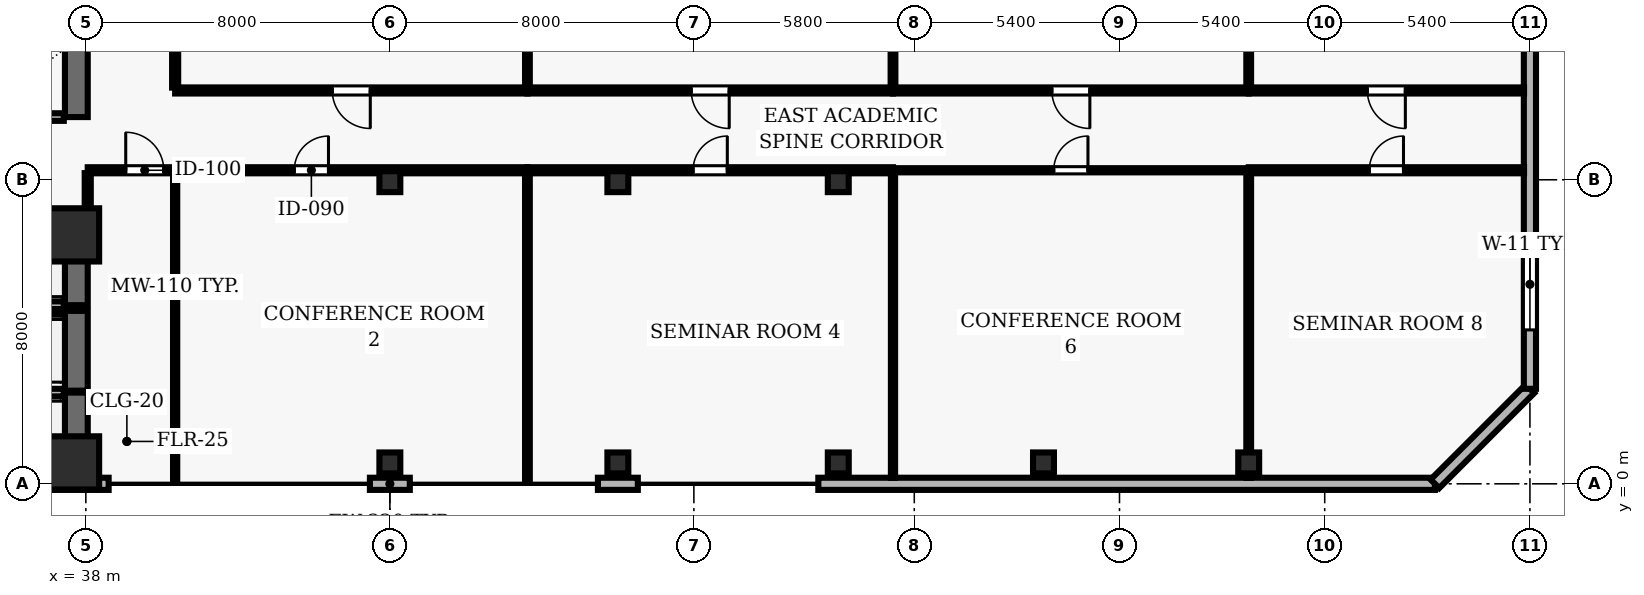
"""IFC4 building model, lengths in metres.
Left out: names, types, materials, properties, quantities, classifications, styles, units other than length and angle.
Written with IfcOpenShell. Run it as: python <this file> out.ifc"""

import sys

from ifc_helpers import new_model, si_unit, direction, frame, frame_2d, origin, origin_2d, place, context, subcontext, project, spatial, rectangle, hollow_rectangle, extrude, element, fill, save


model = new_model("IFC4")
c1 = context("Model", 3, precision=1e-05, world=origin(), true_north=direction((0.0, 1.0)))
c2 = subcontext(c1, "Body", "Model", "MODEL_VIEW")
j1 = project(units=[si_unit("LENGTHUNIT", "METRE"), si_unit("PLANEANGLEUNIT", "RADIAN")], contexts=[c1])
p1 = place(None, origin())
s1 = spatial("IfcSite", under=j1, at=p1, CompositionType="ELEMENT")
p2 = place(p1, origin())
s2 = spatial("IfcBuilding", under=s1, at=p2, CompositionType="ELEMENT")
p3 = place(p2, frame((0.0, 0.0, 85.6)))
s3 = spatial("IfcBuildingStorey", under=s2, at=p3, CompositionType="ELEMENT", Elevation=85.6)
for number, where, z_axis, x_axis in (
    (1, (37.65, 0.55, 0.0), (0.0, 0.0, 1.0), (1.0, 0.0, 0.0)),
    (2, (37.65, 6.55, 0.0), (0.0, 0.0, 1.0), (1.0, 0.0, 0.0)),
):
    element("IfcColumn", number, at=place(p3, frame(where, z_axis=z_axis, x_axis=x_axis)), inside=s3, PredefinedType="COLUMN", context=c2, shape_type="SweptSolid", body=[
        extrude(rectangle(XDim=1.4, YDim=1.4, at=origin_2d()), origin(), (0.0, 0.0, 1.0), 3.9),
    ])
for number, where, z_axis, x_axis in (
    (3, (46.0, 0.55, 0.0), (0.0, 0.0, 1.0), (1.0, 0.0, 0.0)),
    (4, (46.0, 7.95, 0.0), (0.0, 0.0, 1.0), (1.0, 0.0, 0.0)),
    (5, (52.0, 0.55, 0.0), (0.0, 0.0, 1.0), (1.0, 0.0, 0.0)),
    (6, (52.0, 7.95, 0.0), (0.0, 0.0, 1.0), (1.0, 0.0, 0.0)),
    (7, (57.8, 0.55, 0.0), (0.0, 0.0, 1.0), (1.0, 0.0, 0.0)),
    (8, (57.8, 7.95, 0.0), (0.0, 0.0, 1.0), (1.0, 0.0, 0.0)),
    (9, (63.2, 0.55, 0.0), (0.0, 0.0, 1.0), (1.0, 0.0, 0.0)),
    (10, (68.6, 0.55, 0.0), (0.0, 0.0, 1.0), (1.0, 0.0, 0.0)),
):
    element("IfcColumn", number, at=place(p3, frame(where, z_axis=z_axis, x_axis=x_axis)), inside=s3, PredefinedType="COLUMN", context=c2, shape_type="SweptSolid", body=[
        extrude(hollow_rectangle(XDim=0.55, YDim=0.55, WallThickness=0.025, at=origin_2d()), origin(), (0.0, 0.0, 1.0), 3.9),
    ])
p4 = place(p3, frame((30.8, 0.0, 0.0), z_axis=(0.0, 0.0, 1.0), x_axis=(1.0, 0.0, 0.0)))
e11 = element("IfcWall", 11, at=p4, inside=s3, PredefinedType="SOLIDWALL", context=c2, shape_type="SweptSolid", body=[
    extrude(rectangle(XDim=7.8, YDim=0.32, at=frame_2d((3.9, 0.0))), origin(), (0.0, 0.0, 1.0), 3.69),
])
for number, where, z_axis, x_axis in (
    (12, (45.475, 0.0, 0.0), (0.0, 0.0, 1.0), (1.0, 0.0, 0.0)),
    (13, (51.475, 0.0, 0.0), (0.0, 0.0, 1.0), (1.0, 0.0, 0.0)),
):
    element("IfcWall", number, at=place(p3, frame(where, z_axis=z_axis, x_axis=x_axis)), inside=s3, PredefinedType="SOLIDWALL", context=c2, shape_type="SweptSolid", body=[
        extrude(rectangle(XDim=1.05, YDim=0.32, at=frame_2d((0.525, 0.0))), origin(), (0.0, 0.0, 1.0), 3.69),
    ])
p5 = place(p3, frame((57.275, 0.0, 0.0), z_axis=(0.0, 0.0, 1.0), x_axis=(1.0, 0.0, 0.0)))
e14 = element("IfcWall", 14, at=p5, inside=s3, PredefinedType="SOLIDWALL", context=c2, shape_type="SweptSolid", body=[
    extrude(rectangle(XDim=16.225, YDim=0.32, at=frame_2d((8.113, 0.0))), origin(), (0.0, 0.0, 1.0), 3.69),
])
p6 = place(p3, frame((73.5, 0.0, 0.0), z_axis=(0.0, 0.0, 1.0), x_axis=(0.707106781187, 0.707106781187, 0.0)))
e15 = element("IfcWall", 15, at=p6, inside=s3, PredefinedType="SOLIDWALL", context=c2, shape_type="SweptSolid", body=[
    extrude(rectangle(XDim=3.536, YDim=0.32, at=frame_2d((1.768, 0.0))), origin(), (0.0, 0.0, 1.0), 3.69),
])
p7 = place(p3, frame((76.0, 2.5, 0.0), z_axis=(0.0, 0.0, 1.0), x_axis=(0.0, 1.0, 0.0)))
e16 = element("IfcWall", 16, at=p7, inside=s3, PredefinedType="SOLIDWALL", context=c2, shape_type="SweptSolid", body=[
    extrude(rectangle(XDim=11.0, YDim=0.32, at=frame_2d((5.5, 0.0))), origin(), (0.0, 0.0, 1.0), 3.69),
])
p8 = place(p7, frame((1.55, 0.0, 0.9)))
e17 = element("IfcOpeningElement", 17, at=p8, cuts=e16, PredefinedType="OPENING", context=c2, shape_type="SweptSolid", body=[
    extrude(rectangle(XDim=2.4, YDim=2.2, at=frame_2d((1.2, 1.1))), frame((0.0, 0.17, 0.0), z_axis=(0.0, -1.0, 0.0), x_axis=(1.0, 0.0, 0.0)), (0.0, 0.0, 1.0), 0.34),
])
p9 = place(p3, frame((37.75, 0.3, 0.0), z_axis=(0.0, 0.0, 1.0), x_axis=(0.0, 1.0, 0.0)))
e18 = element("IfcWall", 18, at=p9, inside=s3, PredefinedType="SHEAR", context=c2, shape_type="SweptSolid", body=[
    extrude(rectangle(XDim=2.1, YDim=0.6, at=frame_2d((1.05, 0.0))), origin(), (0.0, 0.0, 1.0), 3.69),
])
for number, where, z_axis, x_axis in (
    (19, (35.28, 0.3, 0.0), (0.0, 0.0, 1.0), (1.0, 0.0, 0.0)),
    (20, (37.42, 2.4, 0.0), (0.0, 0.0, 1.0), (-1.0, 0.0, 0.0)),
):
    element("IfcWall", number, at=place(p3, frame(where, z_axis=z_axis, x_axis=x_axis)), inside=s3, PredefinedType="SOLIDWALL", context=c2, shape_type="SweptSolid", body=[
        extrude(rectangle(XDim=2.14, YDim=0.2, at=frame_2d((1.07, 0.0))), origin(), (0.0, 0.0, 1.0), 3.69),
    ])
p10 = place(p3, frame((37.75, 2.45, 0.0), z_axis=(0.0, 0.0, 1.0), x_axis=(0.0, 1.0, 0.0)))
e21 = element("IfcWall", 21, at=p10, inside=s3, PredefinedType="SHEAR", context=c2, shape_type="SweptSolid", body=[
    extrude(rectangle(XDim=2.1, YDim=0.6, at=frame_2d((1.05, 0.0))), origin(), (0.0, 0.0, 1.0), 3.69),
])
p11 = place(p3, frame((37.42, 4.55, 0.0), z_axis=(0.0, 0.0, 1.0), x_axis=(-1.0, 0.0, 0.0)))
e22 = element("IfcWall", 22, at=p11, inside=s3, PredefinedType="SOLIDWALL", context=c2, shape_type="SweptSolid", body=[
    extrude(rectangle(XDim=2.14, YDim=0.2, at=frame_2d((1.07, 0.0))), origin(), (0.0, 0.0, 1.0), 3.69),
])
p12 = place(p3, frame((37.75, 4.7, 0.0), z_axis=(0.0, 0.0, 1.0), x_axis=(0.0, 1.0, 0.0)))
e23 = element("IfcWall", 23, at=p12, inside=s3, PredefinedType="SHEAR", context=c2, shape_type="SweptSolid", body=[
    extrude(rectangle(XDim=2.25, YDim=0.6, at=frame_2d((1.125, 0.0))), origin(), (0.0, 0.0, 1.0), 3.69),
])
for number, where, z_axis, x_axis in (
    (24, (35.28, 4.7, 0.0), (0.0, 0.0, 1.0), (1.0, 0.0, 0.0)),
    (25, (37.42, 6.95, 0.0), (0.0, 0.0, 1.0), (-1.0, 0.0, 0.0)),
):
    element("IfcWall", number, at=place(p3, frame(where, z_axis=z_axis, x_axis=x_axis)), inside=s3, PredefinedType="SOLIDWALL", context=c2, shape_type="SweptSolid", body=[
        extrude(rectangle(XDim=2.14, YDim=0.2, at=frame_2d((1.07, 0.0))), origin(), (0.0, 0.0, 1.0), 3.69),
    ])
p13 = place(p3, frame((37.75, 9.65, 0.0), z_axis=(0.0, 0.0, 1.0), x_axis=(0.0, 1.0, 0.0)))
e26 = element("IfcWall", 26, at=p13, inside=s3, PredefinedType="SHEAR", context=c2, shape_type="SweptSolid", body=[
    extrude(rectangle(XDim=1.9, YDim=0.6, at=frame_2d((0.95, 0.0))), origin(), (0.0, 0.0, 1.0), 3.69),
])
p14 = place(p3, frame((35.28, 9.65, 0.0), z_axis=(0.0, 0.0, 1.0), x_axis=(1.0, 0.0, 0.0)))
e27 = element("IfcWall", 27, at=p14, inside=s3, PredefinedType="SOLIDWALL", context=c2, shape_type="SweptSolid", body=[
    extrude(rectangle(XDim=2.14, YDim=0.2, at=frame_2d((1.07, 0.0))), origin(), (0.0, 0.0, 1.0), 3.69),
])
p15 = place(p3, frame((38.05, 8.25, 0.0), z_axis=(0.0, 0.0, 1.0), x_axis=(1.0, 0.0, 0.0)))
e28 = element("IfcWall", 28, at=p15, inside=s3, PredefinedType="PARTITIONING", context=c2, shape_type="SweptSolid", body=[
    extrude(rectangle(XDim=2.3, YDim=0.16, at=frame_2d((1.15, 0.0))), origin(), (0.0, 0.0, 1.0), 2.995),
])
p16 = place(p15, frame((1.0, 0.0, 0.0)))
e29 = element("IfcOpeningElement", 29, at=p16, cuts=e28, PredefinedType="OPENING", context=c2, shape_type="SweptSolid", body=[
    extrude(rectangle(XDim=1.0, YDim=2.1, at=frame_2d((0.5, 1.05))), frame((0.0, 0.09, 0.0), z_axis=(0.0, -1.0, 0.0), x_axis=(1.0, 0.0, 0.0)), (0.0, 0.0, 1.0), 0.18),
])
p17 = place(p3, frame((40.35, 8.25, 0.0), z_axis=(0.0, 0.0, 1.0), x_axis=(1.0, 0.0, 0.0)))
e30 = element("IfcWall", 30, at=p17, inside=s3, PredefinedType="PARTITIONING", context=c2, shape_type="SweptSolid", body=[
    extrude(rectangle(XDim=9.27, YDim=0.16, at=frame_2d((4.635, 0.0))), origin(), (0.0, 0.0, 1.0), 2.995),
])
p18 = place(p17, frame((3.135, 0.0, 0.0)))
e31 = element("IfcOpeningElement", 31, at=p18, cuts=e30, PredefinedType="OPENING", context=c2, shape_type="SweptSolid", body=[
    extrude(rectangle(XDim=0.9, YDim=2.1, at=frame_2d((0.45, 1.05))), frame((0.0, 0.09, 0.0), z_axis=(0.0, -1.0, 0.0), x_axis=(1.0, 0.0, 0.0)), (0.0, 0.0, 1.0), 0.18),
])
p19 = place(p3, frame((49.62, 8.25, 0.0), z_axis=(0.0, 0.0, 1.0), x_axis=(1.0, 0.0, 0.0)))
e32 = element("IfcWall", 32, at=p19, inside=s3, PredefinedType="PARTITIONING", context=c2, shape_type="SweptSolid", body=[
    extrude(rectangle(XDim=9.62, YDim=0.16, at=frame_2d((4.81, 0.0))), origin(), (0.0, 0.0, 1.0), 2.995),
])
p20 = place(p19, frame((4.36, 0.0, 0.0)))
e33 = element("IfcOpeningElement", 33, at=p20, cuts=e32, PredefinedType="OPENING", context=c2, shape_type="SweptSolid", body=[
    extrude(rectangle(XDim=0.9, YDim=2.1, at=frame_2d((0.45, 1.05))), frame((0.0, 0.09, 0.0), z_axis=(0.0, -1.0, 0.0), x_axis=(1.0, 0.0, 0.0)), (0.0, 0.0, 1.0), 0.18),
])
p21 = place(p3, frame((49.62, 10.35, 0.0), z_axis=(0.0, 0.0, 1.0), x_axis=(-1.0, 0.0, 0.0)))
e34 = element("IfcWall", 34, at=p21, inside=s3, PredefinedType="PARTITIONING", context=c2, shape_type="SweptSolid", body=[
    extrude(rectangle(XDim=9.27, YDim=0.16, at=frame_2d((4.635, 0.0))), origin(), (0.0, 0.0, 1.0), 3.227),
])
p22 = place(p21, frame((4.135, 0.0, 0.0)))
e35 = element("IfcOpeningElement", 35, at=p22, cuts=e34, PredefinedType="OPENING", context=c2, shape_type="SweptSolid", body=[
    extrude(rectangle(XDim=1.0, YDim=2.1, at=frame_2d((0.5, 1.05))), frame((0.0, 0.09, 0.0), z_axis=(0.0, -1.0, 0.0), x_axis=(1.0, 0.0, 0.0)), (0.0, 0.0, 1.0), 0.18),
])
p23 = place(p3, frame((59.24, 8.25, 0.0), z_axis=(0.0, 0.0, 1.0), x_axis=(1.0, 0.0, 0.0)))
e36 = element("IfcWall", 36, at=p23, inside=s3, PredefinedType="MOVABLE", context=c2, shape_type="SweptSolid", body=[
    extrude(rectangle(XDim=9.36, YDim=0.11, at=frame_2d((4.68, 0.0))), origin(), (0.0, 0.0, 1.0), 3.69),
])
p24 = place(p23, frame((4.23, 0.0, 0.0)))
e37 = element("IfcOpeningElement", 37, at=p24, cuts=e36, PredefinedType="OPENING", context=c2, shape_type="SweptSolid", body=[
    extrude(rectangle(XDim=0.9, YDim=2.1, at=frame_2d((0.45, 1.05))), frame((0.0, 0.065, 0.0), z_axis=(0.0, -1.0, 0.0), x_axis=(1.0, 0.0, 0.0)), (0.0, 0.0, 1.0), 0.13),
])
p25 = place(p3, frame((59.24, 10.35, 0.0), z_axis=(0.0, 0.0, 1.0), x_axis=(-1.0, 0.0, 0.0)))
e38 = element("IfcWall", 38, at=p25, inside=s3, PredefinedType="PARTITIONING", context=c2, shape_type="SweptSolid", body=[
    extrude(rectangle(XDim=9.62, YDim=0.16, at=frame_2d((4.81, 0.0))), origin(), (0.0, 0.0, 1.0), 3.227),
])
p26 = place(p25, frame((4.31, 0.0, 0.0)))
e39 = element("IfcOpeningElement", 39, at=p26, cuts=e38, PredefinedType="OPENING", context=c2, shape_type="SweptSolid", body=[
    extrude(rectangle(XDim=1.0, YDim=2.1, at=frame_2d((0.5, 1.05))), frame((0.0, 0.09, 0.0), z_axis=(0.0, -1.0, 0.0), x_axis=(1.0, 0.0, 0.0)), (0.0, 0.0, 1.0), 0.18),
])
p27 = place(p3, frame((68.6, 8.25, 0.0), z_axis=(0.0, 0.0, 1.0), x_axis=(1.0, 0.0, 0.0)))
e40 = element("IfcWall", 40, at=p27, inside=s3, PredefinedType="PARTITIONING", context=c2, shape_type="SweptSolid", body=[
    extrude(rectangle(XDim=7.245, YDim=0.16, at=frame_2d((3.623, 0.0))), origin(), (0.0, 0.0, 1.0), 3.69),
])
p28 = place(p27, frame((3.173, 0.0, 0.0)))
e41 = element("IfcOpeningElement", 41, at=p28, cuts=e40, PredefinedType="OPENING", context=c2, shape_type="SweptSolid", body=[
    extrude(rectangle(XDim=0.9, YDim=2.1, at=frame_2d((0.45, 1.05))), frame((0.0, 0.09, 0.0), z_axis=(0.0, -1.0, 0.0), x_axis=(1.0, 0.0, 0.0)), (0.0, 0.0, 1.0), 0.18),
])
p29 = place(p3, frame((68.6, 10.35, 0.0), z_axis=(0.0, 0.0, 1.0), x_axis=(-1.0, 0.0, 0.0)))
e42 = element("IfcWall", 42, at=p29, inside=s3, PredefinedType="PARTITIONING", context=c2, shape_type="SweptSolid", body=[
    extrude(rectangle(XDim=9.36, YDim=0.16, at=frame_2d((4.68, 0.0))), origin(), (0.0, 0.0, 1.0), 3.227),
])
p30 = place(p29, frame((4.18, 0.0, 0.0)))
e43 = element("IfcOpeningElement", 43, at=p30, cuts=e42, PredefinedType="OPENING", context=c2, shape_type="SweptSolid", body=[
    extrude(rectangle(XDim=1.0, YDim=2.1, at=frame_2d((0.5, 1.05))), frame((0.0, 0.09, 0.0), z_axis=(0.0, -1.0, 0.0), x_axis=(1.0, 0.0, 0.0)), (0.0, 0.0, 1.0), 0.18),
])
p31 = place(p3, frame((75.845, 10.35, 0.0), z_axis=(0.0, 0.0, 1.0), x_axis=(-1.0, 0.0, 0.0)))
e44 = element("IfcWall", 44, at=p31, inside=s3, PredefinedType="PARTITIONING", context=c2, shape_type="SweptSolid", body=[
    extrude(rectangle(XDim=7.245, YDim=0.16, at=frame_2d((3.623, 0.0))), origin(), (0.0, 0.0, 1.0), 3.69),
])
p32 = place(p31, frame((3.123, 0.0, 0.0)))
e45 = element("IfcOpeningElement", 45, at=p32, cuts=e44, PredefinedType="OPENING", context=c2, shape_type="SweptSolid", body=[
    extrude(rectangle(XDim=1.0, YDim=2.1, at=frame_2d((0.5, 1.05))), frame((0.0, 0.09, 0.0), z_axis=(0.0, -1.0, 0.0), x_axis=(1.0, 0.0, 0.0)), (0.0, 0.0, 1.0), 0.18),
])
p33 = place(p3, frame((38.05, 7.05, 0.0), z_axis=(0.0, 0.0, 1.0), x_axis=(0.0, 1.0, 0.0)))
e46 = element("IfcWall", 46, at=p33, inside=s3, PredefinedType="PARTITIONING", context=c2, shape_type="SweptSolid", body=[
    extrude(rectangle(XDim=1.125, YDim=0.16, at=frame_2d((0.562, 0.0))), origin(), (0.0, 0.0, 1.0), 2.995),
])
p34 = place(p3, frame((40.35, 0.09, 0.0), z_axis=(0.0, 0.0, 1.0), x_axis=(0.0, 1.0, 0.0)))
e47 = element("IfcWall", 47, at=p34, inside=s3, PredefinedType="MOVABLE", context=c2, shape_type="SweptSolid", body=[
    extrude(rectangle(XDim=8.085, YDim=0.11, at=frame_2d((4.042, 0.0))), origin(), (0.0, 0.0, 1.0), 3.69),
])
p35 = place(p3, frame((40.35, 10.425, 0.0), z_axis=(0.0, 0.0, 1.0), x_axis=(0.0, 1.0, 0.0)))
e48 = element("IfcWall", 48, at=p35, inside=s3, PredefinedType="PARTITIONING", context=c2, shape_type="SweptSolid", body=[
    extrude(rectangle(XDim=5.5, YDim=0.16, at=frame_2d((2.75, 0.0))), origin(), (0.0, 0.0, 1.0), 3.227),
])
p36 = place(p3, frame((49.62, 0.09, 0.0), z_axis=(0.0, 0.0, 1.0), x_axis=(0.0, 1.0, 0.0)))
e49 = element("IfcWall", 49, at=p36, inside=s3, PredefinedType="PARTITIONING", context=c2, shape_type="SweptSolid", body=[
    extrude(rectangle(XDim=8.085, YDim=0.125, at=frame_2d((4.042, 0.0))), origin(), (0.0, 0.0, 1.0), 3.69),
])
p37 = place(p3, frame((49.62, 10.425, 0.0), z_axis=(0.0, 0.0, 1.0), x_axis=(0.0, 1.0, 0.0)))
e50 = element("IfcWall", 50, at=p37, inside=s3, PredefinedType="PARTITIONING", context=c2, shape_type="SweptSolid", body=[
    extrude(rectangle(XDim=5.42, YDim=0.125, at=frame_2d((2.71, 0.0))), origin(), (0.0, 0.0, 1.0), 3.69),
])
p38 = place(p3, frame((59.24, 0.155, 0.0), z_axis=(0.0, 0.0, 1.0), x_axis=(0.0, 1.0, 0.0)))
e51 = element("IfcWall", 51, at=p38, inside=s3, PredefinedType="MOVABLE", context=c2, shape_type="SweptSolid", body=[
    extrude(rectangle(XDim=8.02, YDim=0.11, at=frame_2d((4.01, 0.0))), origin(), (0.0, 0.0, 1.0), 3.69),
])
p39 = place(p3, frame((59.24, 10.425, 0.0), z_axis=(0.0, 0.0, 1.0), x_axis=(0.0, 1.0, 0.0)))
e52 = element("IfcWall", 52, at=p39, inside=s3, PredefinedType="PARTITIONING", context=c2, shape_type="SweptSolid", body=[
    extrude(rectangle(XDim=5.42, YDim=0.125, at=frame_2d((2.71, 0.0))), origin(), (0.0, 0.0, 1.0), 3.69),
])
p40 = place(p3, frame((68.6, 0.155, 0.0), z_axis=(0.0, 0.0, 1.0), x_axis=(0.0, 1.0, 0.0)))
e53 = element("IfcWall", 53, at=p40, inside=s3, PredefinedType="PARTITIONING", context=c2, shape_type="SweptSolid", body=[
    extrude(rectangle(XDim=8.02, YDim=0.125, at=frame_2d((4.01, 0.0))), origin(), (0.0, 0.0, 1.0), 2.995),
])
p41 = place(p3, frame((68.6, 10.425, 0.0), z_axis=(0.0, 0.0, 1.0), x_axis=(0.0, 1.0, 0.0)))
e54 = element("IfcWall", 54, at=p41, inside=s3, PredefinedType="PARTITIONING", context=c2, shape_type="SweptSolid", body=[
    extrude(rectangle(XDim=5.42, YDim=0.125, at=frame_2d((2.71, 0.0))), origin(), (0.0, 0.0, 1.0), 2.995),
])
p42 = place(p8, origin())
e55 = element("IfcWindow", 55, at=p42, inside=s3, PartitioningType="SINGLE_PANEL", PredefinedType="WINDOW", context=c2, shape_type="SweptSolid", body=[
    extrude(rectangle(XDim=2.4, YDim=2.2, at=frame_2d((1.2, 1.1))), frame((0.0, 0.03, 0.0), z_axis=(0.0, -1.0, 0.0), x_axis=(1.0, 0.0, 0.0)), (0.0, 0.0, 1.0), 0.06),
])
fill(e17, e55)
p43 = place(p16, origin())
e56 = element("IfcDoor", 56, at=p43, inside=s3, OperationType="SINGLE_SWING_LEFT", PredefinedType="DOOR", context=c2, shape_type="SweptSolid", body=[
    extrude(rectangle(XDim=1.0, YDim=2.1, at=frame_2d((0.5, 1.05))), frame((0.0, 0.025, 0.0), z_axis=(0.0, -1.0, 0.0), x_axis=(1.0, 0.0, 0.0)), (0.0, 0.0, 1.0), 0.05),
])
fill(e29, e56)
p44 = place(p18, origin())
e57 = element("IfcDoor", 57, at=p44, inside=s3, OperationType="SINGLE_SWING_RIGHT", PredefinedType="DOOR", context=c2, shape_type="SweptSolid", body=[
    extrude(rectangle(XDim=0.9, YDim=2.1, at=frame_2d((0.45, 1.05))), frame((0.0, 0.025, 0.0), z_axis=(0.0, -1.0, 0.0), x_axis=(1.0, 0.0, 0.0)), (0.0, 0.0, 1.0), 0.05),
])
fill(e31, e57)
p45 = place(p22, origin())
e58 = element("IfcDoor", 58, at=p45, inside=s3, OperationType="SINGLE_SWING_LEFT", PredefinedType="DOOR", context=c2, shape_type="SweptSolid", body=[
    extrude(rectangle(XDim=1.0, YDim=2.1, at=frame_2d((0.5, 1.05))), frame((0.0, 0.025, 0.0), z_axis=(0.0, -1.0, 0.0), x_axis=(1.0, 0.0, 0.0)), (0.0, 0.0, 1.0), 0.05),
])
fill(e35, e58)
p46 = place(p20, origin())
e59 = element("IfcDoor", 59, at=p46, inside=s3, OperationType="SINGLE_SWING_RIGHT", PredefinedType="DOOR", context=c2, shape_type="SweptSolid", body=[
    extrude(rectangle(XDim=0.9, YDim=2.1, at=frame_2d((0.45, 1.05))), frame((0.0, 0.025, 0.0), z_axis=(0.0, -1.0, 0.0), x_axis=(1.0, 0.0, 0.0)), (0.0, 0.0, 1.0), 0.05),
])
fill(e33, e59)
p47 = place(p26, origin())
e60 = element("IfcDoor", 60, at=p47, inside=s3, OperationType="SINGLE_SWING_LEFT", PredefinedType="DOOR", context=c2, shape_type="SweptSolid", body=[
    extrude(rectangle(XDim=1.0, YDim=2.1, at=frame_2d((0.5, 1.05))), frame((0.0, 0.025, 0.0), z_axis=(0.0, -1.0, 0.0), x_axis=(1.0, 0.0, 0.0)), (0.0, 0.0, 1.0), 0.05),
])
fill(e39, e60)
p48 = place(p24, origin())
e61 = element("IfcDoor", 61, at=p48, inside=s3, OperationType="SINGLE_SWING_RIGHT", PredefinedType="DOOR", context=c2, shape_type="SweptSolid", body=[
    extrude(rectangle(XDim=0.9, YDim=2.1, at=frame_2d((0.45, 1.05))), frame((0.0, 0.025, 0.0), z_axis=(0.0, -1.0, 0.0), x_axis=(1.0, 0.0, 0.0)), (0.0, 0.0, 1.0), 0.05),
])
fill(e37, e61)
p49 = place(p30, origin())
e62 = element("IfcDoor", 62, at=p49, inside=s3, OperationType="SINGLE_SWING_LEFT", PredefinedType="DOOR", context=c2, shape_type="SweptSolid", body=[
    extrude(rectangle(XDim=1.0, YDim=2.1, at=frame_2d((0.5, 1.05))), frame((0.0, 0.025, 0.0), z_axis=(0.0, -1.0, 0.0), x_axis=(1.0, 0.0, 0.0)), (0.0, 0.0, 1.0), 0.05),
])
fill(e43, e62)
p50 = place(p28, origin())
e63 = element("IfcDoor", 63, at=p50, inside=s3, OperationType="SINGLE_SWING_RIGHT", PredefinedType="DOOR", context=c2, shape_type="SweptSolid", body=[
    extrude(rectangle(XDim=0.9, YDim=2.1, at=frame_2d((0.45, 1.05))), frame((0.0, 0.025, 0.0), z_axis=(0.0, -1.0, 0.0), x_axis=(1.0, 0.0, 0.0)), (0.0, 0.0, 1.0), 0.05),
])
fill(e41, e63)
p51 = place(p32, origin())
e64 = element("IfcDoor", 64, at=p51, inside=s3, OperationType="SINGLE_SWING_LEFT", PredefinedType="DOOR", context=c2, shape_type="SweptSolid", body=[
    extrude(rectangle(XDim=1.0, YDim=2.1, at=frame_2d((0.5, 1.05))), frame((0.0, 0.025, 0.0), z_axis=(0.0, -1.0, 0.0), x_axis=(1.0, 0.0, 0.0)), (0.0, 0.0, 1.0), 0.05),
])
fill(e45, e64)
save(model, sys.argv[1])
